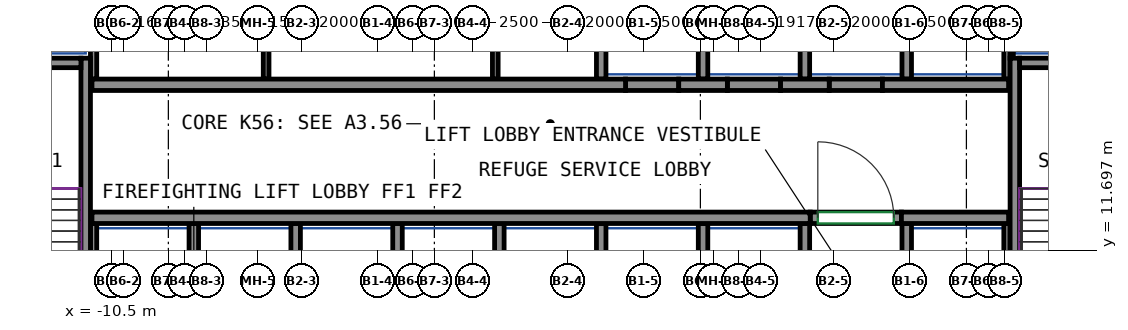
"""IFC4 building model, lengths in metres.
Left out: names, types, materials, properties, quantities, classifications, styles, units other than length and angle.
Written with IfcOpenShell. Run it as: python <this file> out.ifc"""

import sys

from ifc_helpers import new_model, si_unit, direction, frame, frame_2d, origin, place, context, subcontext, project, spatial, rectangle, extrude, source, transform, mapped, element, fill, save


model = new_model("IFC4")
c1 = context("Model", 3, precision=1e-05, world=origin(), true_north=direction((0.0, 1.0)))
c2 = subcontext(c1, "Body", "Model", "MODEL_VIEW")
j1 = project(units=[si_unit("LENGTHUNIT", "METRE"), si_unit("PLANEANGLEUNIT", "RADIAN")], contexts=[c1])
p1 = place(None, origin())
s1 = spatial("IfcSite", under=j1, at=p1, CompositionType="ELEMENT")
p2 = place(p1, origin())
s2 = spatial("IfcBuilding", under=s1, at=p2, CompositionType="ELEMENT")
p3 = place(p2, frame((0.0, 0.0, 223.7)))
s3 = spatial("IfcBuildingStorey", under=s2, at=p3, CompositionType="ELEMENT", Elevation=223.7)
m1 = source(origin(), c2, "Body", "SweptSolid", [
    extrude(rectangle(XDim=7.75, YDim=0.25, at=frame_2d((3.875, 0.0))), origin(), (0.0, 0.0, 1.0), 9.5),
])
p4 = place(p3, frame((-11.175, 9.0, 0.0), z_axis=(0.0, 0.0, 1.0), x_axis=(0.0, 1.0, 0.0)))
e1 = element("IfcWall", 1, at=p4, inside=s3, PredefinedType="SHEAR", context=c2, shape_type="MappedRepresentation", body=[
    mapped(m1, transform((0.0, 0.0, 0.0))),
])
m2 = source(origin(), c2, "Body", "SweptSolid", [
    extrude(rectangle(XDim=3.7, YDim=0.25, at=frame_2d((1.85, 0.0))), origin(), (0.0, 0.0, 1.0), 9.5),
])
p5 = place(p3, frame((-15.0, 16.625, 0.0), z_axis=(0.0, 0.0, 1.0), x_axis=(1.0, 0.0, 0.0)))
e2 = element("IfcWall", 2, at=p5, inside=s3, PredefinedType="SHEAR", context=c2, shape_type="MappedRepresentation", body=[
    mapped(m2, transform((0.0, 0.0, 0.0))),
])
p6 = place(p3, frame((13.275, 9.0, 0.0), z_axis=(0.0, 0.0, 1.0), x_axis=(0.0, 1.0, 0.0)))
e3 = element("IfcWall", 3, at=p6, inside=s3, PredefinedType="SHEAR", context=c2, shape_type="MappedRepresentation", body=[
    mapped(m1, transform((0.0, 0.0, 0.0))),
])
m3 = source(origin(), c2, "Body", "SweptSolid", [
    extrude(rectangle(XDim=3.7, YDim=0.25, at=frame_2d((1.85, 0.0))), origin(), (0.0, 0.0, 1.0), 9.5),
])
p7 = place(p3, frame((13.4, 16.625, 0.0), z_axis=(0.0, 0.0, 1.0), x_axis=(1.0, 0.0, 0.0)))
e4 = element("IfcWall", 4, at=p7, inside=s3, PredefinedType="SHEAR", context=c2, shape_type="MappedRepresentation", body=[
    mapped(m3, transform((0.0, 0.0, 0.0))),
])
m4 = source(origin(), c2, "Body", "SweptSolid", [
    extrude(rectangle(XDim=18.9, YDim=0.3, at=frame_2d((9.45, 0.0))), origin(), (0.0, 0.0, 1.0), 9.5),
])
p8 = place(p3, frame((-11.01, 12.55, 0.0), z_axis=(0.0, 0.0, 1.0), x_axis=(1.0, 0.0, 0.0)))
e5 = element("IfcWall", 5, at=p8, inside=s3, PredefinedType="SHEAR", context=c2, shape_type="MappedRepresentation", body=[
    mapped(m4, transform((0.0, 0.0, 0.0))),
])
m5 = source(origin(), c2, "Body", "SweptSolid", [
    extrude(rectangle(XDim=2.82, YDim=0.3, at=frame_2d((1.41, 0.0))), origin(), (0.0, 0.0, 1.0), 9.5),
])
p9 = place(p3, frame((10.29, 12.55, 0.0), z_axis=(0.0, 0.0, 1.0), x_axis=(1.0, 0.0, 0.0)))
e6 = element("IfcWall", 6, at=p9, inside=s3, PredefinedType="SHEAR", context=c2, shape_type="MappedRepresentation", body=[
    mapped(m5, transform((0.0, 0.0, 0.0))),
])
m6 = source(origin(), c2, "Body", "SweptSolid", [
    extrude(rectangle(XDim=14.04, YDim=0.3, at=frame_2d((7.02, 0.0))), origin(), (0.0, 0.0, 1.0), 9.5),
])
p10 = place(p3, frame((-11.01, 16.05, 0.0), z_axis=(0.0, 0.0, 1.0), x_axis=(1.0, 0.0, 0.0)))
e7 = element("IfcWall", 7, at=p10, inside=s3, PredefinedType="SHEAR", context=c2, shape_type="MappedRepresentation", body=[
    mapped(m6, transform((0.0, 0.0, 0.0))),
])
m7 = source(origin(), c2, "Body", "SweptSolid", [
    extrude(rectangle(XDim=1.28, YDim=0.3, at=frame_2d((0.64, 0.0))), origin(), (0.0, 0.0, 1.0), 9.5),
])
p11 = place(p3, frame((4.43, 16.05, 0.0), z_axis=(0.0, 0.0, 1.0), x_axis=(1.0, 0.0, 0.0)))
e8 = element("IfcWall", 8, at=p11, inside=s3, PredefinedType="SHEAR", context=c2, shape_type="MappedRepresentation", body=[
    mapped(m7, transform((0.0, 0.0, 0.0))),
])
m8 = source(origin(), c2, "Body", "SweptSolid", [
    extrude(rectangle(XDim=1.28, YDim=0.3, at=frame_2d((0.64, 0.0))), origin(), (0.0, 0.0, 1.0), 9.5),
])
p12 = place(p3, frame((7.11, 16.05, 0.0), z_axis=(0.0, 0.0, 1.0), x_axis=(1.0, 0.0, 0.0)))
e9 = element("IfcWall", 9, at=p12, inside=s3, PredefinedType="SHEAR", context=c2, shape_type="MappedRepresentation", body=[
    mapped(m8, transform((0.0, 0.0, 0.0))),
])
m9 = source(origin(), c2, "Body", "SweptSolid", [
    extrude(rectangle(XDim=3.32, YDim=0.3, at=frame_2d((1.66, 0.0))), origin(), (0.0, 0.0, 1.0), 9.5),
])
p13 = place(p3, frame((9.79, 16.05, 0.0), z_axis=(0.0, 0.0, 1.0), x_axis=(1.0, 0.0, 0.0)))
e10 = element("IfcWall", 10, at=p13, inside=s3, PredefinedType="SHEAR", context=c2, shape_type="MappedRepresentation", body=[
    mapped(m9, transform((0.0, 0.0, 0.0))),
])
m10 = source(origin(), c2, "Body", "SweptSolid", [
    extrude(rectangle(XDim=2.4, YDim=0.3, at=frame_2d((1.2, 0.0))), origin(), (0.0, 0.0, 1.0), 9.5),
])
p14 = place(p3, frame((7.89, 12.55, 0.0), z_axis=(0.0, 0.0, 1.0), x_axis=(1.0, 0.0, 0.0)))
e11 = element("IfcWall", 11, at=p14, inside=s3, PredefinedType="PARTITIONING", context=c2, shape_type="MappedRepresentation", body=[
    mapped(m10, transform((0.0, 0.0, 0.0))),
])
p15 = place(p14, frame((0.2, 0.0, 0.0)))
e12 = element("IfcOpeningElement", 12, at=p15, cuts=e11, PredefinedType="OPENING", context=c2, shape_type="SweptSolid", body=[
    extrude(rectangle(XDim=2.0, YDim=2.1, at=frame_2d((1.0, 1.05))), frame((0.0, 0.16, 0.0), z_axis=(0.0, -1.0, 0.0), x_axis=(1.0, 0.0, 0.0)), (0.0, 0.0, 1.0), 0.32),
])
m11 = source(origin(), c2, "Body", "SweptSolid", [
    extrude(rectangle(XDim=1.4, YDim=0.3, at=frame_2d((0.7, 0.0))), origin(), (0.0, 0.0, 1.0), 9.5),
])
p16 = place(p3, frame((3.03, 16.05, 0.0), z_axis=(0.0, 0.0, 1.0), x_axis=(1.0, 0.0, 0.0)))
e13 = element("IfcWall", 13, at=p16, inside=s3, PredefinedType="PARTITIONING", context=c2, shape_type="MappedRepresentation", body=[
    mapped(m11, transform((0.0, 0.0, 0.0))),
])
m12 = source(origin(), c2, "Body", "SweptSolid", [
    extrude(rectangle(XDim=1.4, YDim=0.3, at=frame_2d((0.7, 0.0))), origin(), (0.0, 0.0, 1.0), 9.5),
])
for number, where, z_axis, x_axis in (
    (14, (5.71, 16.05, 0.0), (0.0, 0.0, 1.0), (1.0, 0.0, 0.0)),
    (15, (8.39, 16.05, 0.0), (0.0, 0.0, 1.0), (1.0, 0.0, 0.0)),
):
    element("IfcWall", number, at=place(p3, frame(where, z_axis=z_axis, x_axis=x_axis)), inside=s3, PredefinedType="PARTITIONING", context=c2, shape_type="MappedRepresentation", body=[
        mapped(m12, transform((0.0, 0.0, 0.0))),
    ])
m13 = source(origin(), c2, "Body", "SweptSolid", [
    extrude(rectangle(XDim=3.275, YDim=0.165, at=frame_2d((1.638, 0.0))), origin(), (0.0, 0.0, 1.0), 9.5),
])
p17 = place(p3, frame((13.067, 16.2, 0.0), z_axis=(0.0, 0.0, 1.0), x_axis=(0.0, 1.0, 0.0)))
e16 = element("IfcWall", 16, at=p17, inside=s3, PredefinedType="PARTITIONING", context=c2, shape_type="MappedRepresentation", body=[
    mapped(m13, transform((0.0, 0.0, 0.0))),
])
m14 = source(origin(), c2, "Body", "SweptSolid", [
    extrude(rectangle(XDim=4.8, YDim=0.165, at=frame_2d((2.4, 0.0))), origin(), (0.0, 0.0, 1.0), 9.5),
])
p18 = place(p3, frame((-10.968, 16.2, 0.0), z_axis=(0.0, 0.0, 1.0), x_axis=(0.0, 1.0, 0.0)))
e17 = element("IfcWall", 17, at=p18, inside=s3, PredefinedType="PARTITIONING", context=c2, shape_type="MappedRepresentation", body=[
    mapped(m14, transform((0.0, 0.0, 0.0))),
])
m15 = source(origin(), c2, "Body", "SweptSolid", [
    extrude(rectangle(XDim=3.275, YDim=0.25, at=frame_2d((1.638, 0.0))), origin(), (0.0, 0.0, 1.0), 9.5),
])
p19 = place(p3, frame((10.43, 16.2, 0.0), z_axis=(0.0, 0.0, 1.0), x_axis=(0.0, 1.0, 0.0)))
e18 = element("IfcWall", 18, at=p19, inside=s3, PredefinedType="PARTITIONING", context=c2, shape_type="MappedRepresentation", body=[
    mapped(m15, transform((0.0, 0.0, 0.0))),
])
m16 = source(origin(), c2, "Body", "SweptSolid", [
    extrude(rectangle(XDim=2.725, YDim=0.085, at=frame_2d((1.363, 0.0))), origin(), (0.0, 0.0, 1.0), 9.5),
])
p20 = place(p3, frame((13.192, 16.75, 0.0), z_axis=(0.0, 0.0, 1.0), x_axis=(0.0, 1.0, 0.0)))
e19 = element("IfcWall", 19, at=p20, inside=s3, PredefinedType="PARTITIONING", context=c2, shape_type="MappedRepresentation", body=[
    mapped(m16, transform((0.0, 0.0, 0.0))),
])
for number, where, z_axis, x_axis in (
    (20, (2.39, 16.2, 0.0), (0.0, 0.0, 1.0), (0.0, 1.0, 0.0)),
    (21, (5.07, 16.2, 0.0), (0.0, 0.0, 1.0), (0.0, 1.0, 0.0)),
    (22, (7.75, 16.2, 0.0), (0.0, 0.0, 1.0), (0.0, 1.0, 0.0)),
):
    element("IfcWall", number, at=place(p3, frame(where, z_axis=z_axis, x_axis=x_axis)), inside=s3, PredefinedType="PARTITIONING", context=c2, shape_type="MappedRepresentation", body=[
        mapped(m15, transform((0.0, 0.0, 0.0))),
    ])
m17 = source(origin(), c2, "Body", "SweptSolid", [
    extrude(rectangle(XDim=3.4, YDim=0.25, at=frame_2d((1.7, 0.0))), origin(), (0.0, 0.0, 1.0), 9.5),
])
p21 = place(p3, frame((10.43, 9.0, 0.0), z_axis=(0.0, 0.0, 1.0), x_axis=(0.0, 1.0, 0.0)))
e23 = element("IfcWall", 23, at=p21, inside=s3, PredefinedType="PARTITIONING", context=c2, shape_type="MappedRepresentation", body=[
    mapped(m17, transform((0.0, 0.0, 0.0))),
])
m18 = source(origin(), c2, "Body", "SweptSolid", [
    extrude(rectangle(XDim=3.4, YDim=0.165, at=frame_2d((1.7, 0.0))), origin(), (0.0, 0.0, 1.0), 9.5),
])
p22 = place(p3, frame((13.067, 9.0, 0.0), z_axis=(0.0, 0.0, 1.0), x_axis=(0.0, 1.0, 0.0)))
e24 = element("IfcWall", 24, at=p22, inside=s3, PredefinedType="PARTITIONING", context=c2, shape_type="MappedRepresentation", body=[
    mapped(m18, transform((0.0, 0.0, 0.0))),
])
for number, where, z_axis, x_axis in (
    (25, (2.39, 9.0, 0.0), (0.0, 0.0, 1.0), (0.0, 1.0, 0.0)),
    (26, (5.07, 9.0, 0.0), (0.0, 0.0, 1.0), (0.0, 1.0, 0.0)),
    (27, (7.75, 9.0, 0.0), (0.0, 0.0, 1.0), (0.0, 1.0, 0.0)),
    (28, (-0.29, 9.0, 0.0), (0.0, 0.0, 1.0), (0.0, 1.0, 0.0)),
):
    element("IfcWall", number, at=place(p3, frame(where, z_axis=z_axis, x_axis=x_axis)), inside=s3, PredefinedType="PARTITIONING", context=c2, shape_type="MappedRepresentation", body=[
        mapped(m17, transform((0.0, 0.0, 0.0))),
    ])
p23 = place(p3, frame((-10.968, 9.0, 0.0), z_axis=(0.0, 0.0, 1.0), x_axis=(0.0, 1.0, 0.0)))
e29 = element("IfcWall", 29, at=p23, inside=s3, PredefinedType="PARTITIONING", context=c2, shape_type="MappedRepresentation", body=[
    mapped(m18, transform((0.0, 0.0, 0.0))),
])
for number, where, z_axis, x_axis in (
    (30, (-2.97, 9.0, 0.0), (0.0, 0.0, 1.0), (0.0, 1.0, 0.0)),
    (31, (-5.65, 9.0, 0.0), (0.0, 0.0, 1.0), (0.0, 1.0, 0.0)),
    (32, (-8.33, 9.0, 0.0), (0.0, 0.0, 1.0), (0.0, 1.0, 0.0)),
):
    element("IfcWall", number, at=place(p3, frame(where, z_axis=z_axis, x_axis=x_axis)), inside=s3, PredefinedType="PARTITIONING", context=c2, shape_type="MappedRepresentation", body=[
        mapped(m17, transform((0.0, 0.0, 0.0))),
    ])
m19 = source(origin(), c2, "Body", "SweptSolid", [
    extrude(rectangle(XDim=4.8, YDim=0.15, at=frame_2d((2.4, 0.0))), origin(), (0.0, 0.0, 1.0), 9.5),
])
for number, where, z_axis, x_axis in (
    (33, (-6.427, 16.2, 0.0), (0.0, 0.0, 1.0), (0.0, 1.0, 0.0)),
    (34, (-0.397, 16.2, 0.0), (0.0, 0.0, 1.0), (0.0, 1.0, 0.0)),
):
    element("IfcWall", number, at=place(p3, frame(where, z_axis=z_axis, x_axis=x_axis)), inside=s3, PredefinedType="PARTITIONING", context=c2, shape_type="MappedRepresentation", body=[
        mapped(m19, transform((0.0, 0.0, 0.0))),
    ])
p24 = place(p15, origin())
e35 = element("IfcDoor", 35, at=p24, inside=s3, OperationType="DOUBLE_DOOR_SINGLE_SWING", PredefinedType="DOOR", context=c2, shape_type="SweptSolid", body=[
    extrude(rectangle(XDim=2.0, YDim=2.1, at=frame_2d((1.0, 1.05))), frame((0.0, 0.025, 0.0), z_axis=(0.0, -1.0, 0.0), x_axis=(1.0, 0.0, 0.0)), (0.0, 0.0, 1.0), 0.05),
])
fill(e12, e35)
save(model, sys.argv[1])
